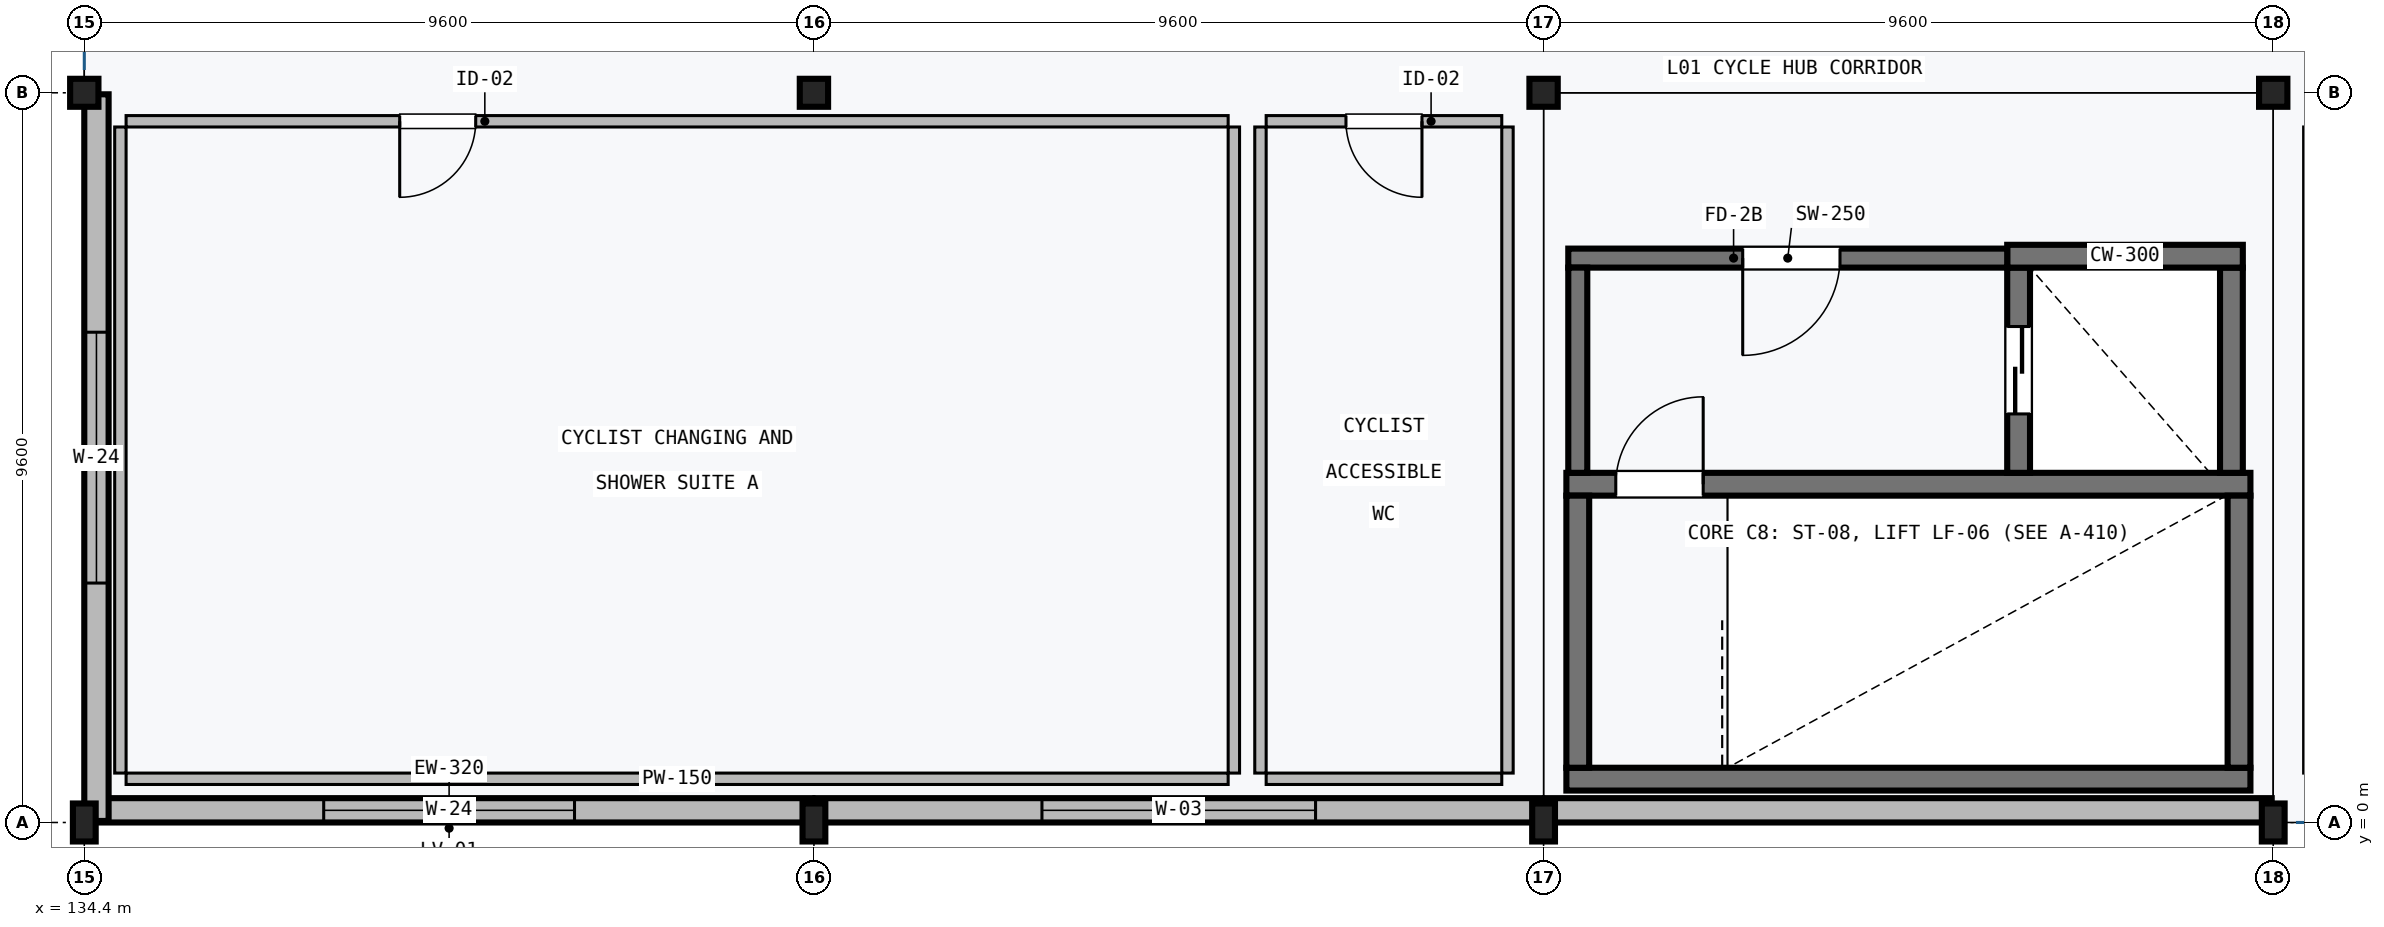
"""IFC4 building model, lengths in metres.
Left out: names, types, materials, properties, quantities, classifications, styles, units other than length and angle.
Written with IfcOpenShell. Run it as: python <this file> out.ifc"""

import sys

from ifc_helpers import new_model, si_unit, direction, frame, frame_2d, origin, origin_2d, place, context, subcontext, project, spatial, rectangle, i_section, extrude, element, fill, save


model = new_model("IFC4")
c1 = context("Model", 3, precision=1e-05, world=origin(), true_north=direction((0.0, 1.0)))
c2 = subcontext(c1, "Body", "Model", "MODEL_VIEW")
j1 = project(units=[si_unit("LENGTHUNIT", "METRE"), si_unit("PLANEANGLEUNIT", "RADIAN")], contexts=[c1])
p1 = place(None, origin())
s1 = spatial("IfcSite", under=j1, at=p1, CompositionType="ELEMENT")
p2 = place(p1, origin())
s2 = spatial("IfcBuilding", under=s1, at=p2, CompositionType="ELEMENT")
p3 = place(p2, frame((0.0, 0.0, 6.0)))
s3 = spatial("IfcBuildingStorey", under=s2, at=p3, CompositionType="ELEMENT", Elevation=6.0)
p4 = place(p3, frame((134.4, 0.0, 0.0), z_axis=(0.0, 0.0, 1.0), x_axis=(1.0, 0.0, 0.0)))
e1 = element("IfcColumn", 1, at=p4, inside=s3, PredefinedType="COLUMN", context=c2, shape_type="SweptSolid", body=[
    extrude(i_section(OverallWidth=0.3, OverallDepth=0.5, WebThickness=0.014, FlangeThickness=0.028, FilletRadius=0.027, at=origin_2d()), origin(), (0.0, 0.0, 1.0), 4.25),
])
p5 = place(p3, frame((134.4, 9.6, 0.0), z_axis=(0.0, 0.0, 1.0), x_axis=(1.0, 0.0, 0.0)))
e2 = element("IfcColumn", 2, at=p5, inside=s3, PredefinedType="COLUMN", context=c2, shape_type="SweptSolid", body=[
    extrude(i_section(OverallWidth=0.373, OverallDepth=0.368, WebThickness=0.014, FlangeThickness=0.024, FilletRadius=0.015, at=origin_2d()), origin(), (0.0, 0.0, 1.0), 4.25),
])
p6 = place(p3, frame((144.0, 0.0, 0.0), z_axis=(0.0, 0.0, 1.0), x_axis=(1.0, 0.0, 0.0)))
e3 = element("IfcColumn", 3, at=p6, inside=s3, PredefinedType="COLUMN", context=c2, shape_type="SweptSolid", body=[
    extrude(i_section(OverallWidth=0.3, OverallDepth=0.5, WebThickness=0.014, FlangeThickness=0.028, FilletRadius=0.027, at=origin_2d()), origin(), (0.0, 0.0, 1.0), 4.25),
])
p7 = place(p3, frame((144.0, 9.6, 0.0), z_axis=(0.0, 0.0, 1.0), x_axis=(1.0, 0.0, 0.0)))
e4 = element("IfcColumn", 4, at=p7, inside=s3, PredefinedType="COLUMN", context=c2, shape_type="SweptSolid", body=[
    extrude(i_section(OverallWidth=0.373, OverallDepth=0.368, WebThickness=0.014, FlangeThickness=0.024, FilletRadius=0.015, at=origin_2d()), origin(), (0.0, 0.0, 1.0), 4.25),
])
p8 = place(p3, frame((153.6, 0.0, 0.0), z_axis=(0.0, 0.0, 1.0), x_axis=(1.0, 0.0, 0.0)))
e5 = element("IfcColumn", 5, at=p8, inside=s3, PredefinedType="COLUMN", context=c2, shape_type="SweptSolid", body=[
    extrude(i_section(OverallWidth=0.3, OverallDepth=0.5, WebThickness=0.014, FlangeThickness=0.028, FilletRadius=0.027, at=origin_2d()), origin(), (0.0, 0.0, 1.0), 4.25),
])
p9 = place(p3, frame((153.6, 9.6, 0.0), z_axis=(0.0, 0.0, 1.0), x_axis=(1.0, 0.0, 0.0)))
e6 = element("IfcColumn", 6, at=p9, inside=s3, PredefinedType="COLUMN", context=c2, shape_type="SweptSolid", body=[
    extrude(i_section(OverallWidth=0.373, OverallDepth=0.368, WebThickness=0.014, FlangeThickness=0.024, FilletRadius=0.015, at=origin_2d()), origin(), (0.0, 0.0, 1.0), 4.25),
])
p10 = place(p3, frame((163.2, 0.0, 0.0), z_axis=(0.0, 0.0, 1.0), x_axis=(1.0, 0.0, 0.0)))
e7 = element("IfcColumn", 7, at=p10, inside=s3, PredefinedType="COLUMN", context=c2, shape_type="SweptSolid", body=[
    extrude(i_section(OverallWidth=0.3, OverallDepth=0.5, WebThickness=0.014, FlangeThickness=0.028, FilletRadius=0.027, at=origin_2d()), origin(), (0.0, 0.0, 1.0), 4.25),
])
p11 = place(p3, frame((163.2, 9.6, 0.0), z_axis=(0.0, 0.0, 1.0), x_axis=(1.0, 0.0, 0.0)))
e8 = element("IfcColumn", 8, at=p11, inside=s3, PredefinedType="COLUMN", context=c2, shape_type="SweptSolid", body=[
    extrude(i_section(OverallWidth=0.373, OverallDepth=0.368, WebThickness=0.014, FlangeThickness=0.024, FilletRadius=0.015, at=origin_2d()), origin(), (0.0, 0.0, 1.0), 4.25),
])
p12 = place(p3, frame((153.9, 0.57, 0.0), z_axis=(0.0, 0.0, 1.0), x_axis=(1.0, 0.0, 0.0)))
e9 = element("IfcWall", 9, at=p12, inside=s3, PredefinedType="SHEAR", context=c2, shape_type="SweptSolid", body=[
    extrude(rectangle(XDim=9.0, YDim=0.3, at=frame_2d((4.5, 0.0))), origin(), (0.0, 0.0, 1.0), 4.25),
])
p13 = place(p3, frame((162.9, 4.45, 0.0), z_axis=(0.0, 0.0, 1.0), x_axis=(-1.0, 0.0, 0.0)))
e10 = element("IfcWall", 10, at=p13, inside=s3, PredefinedType="SHEAR", context=c2, shape_type="SweptSolid", body=[
    extrude(rectangle(XDim=9.0, YDim=0.3, at=frame_2d((4.5, 0.0))), origin(), (0.0, 0.0, 1.0), 4.5),
])
p14 = place(p13, frame((7.2, 0.0, 0.0)))
e11 = element("IfcOpeningElement", 11, at=p14, cuts=e10, PredefinedType="OPENING", context=c2, shape_type="SweptSolid", body=[
    extrude(rectangle(XDim=1.15, YDim=2.15, at=frame_2d((0.575, 1.075))), frame((0.0, 0.16, 0.0), z_axis=(0.0, -1.0, 0.0), x_axis=(1.0, 0.0, 0.0)), (0.0, 0.0, 1.0), 0.32),
])
for number, where, z_axis, x_axis in (
    (12, (154.05, 0.72, 0.0), (0.0, 0.0, 1.0), (0.0, 1.0, 0.0)),
    (13, (162.75, 4.3, 0.0), (0.0, 0.0, 1.0), (0.0, -1.0, 0.0)),
):
    element("IfcWall", number, at=place(p3, frame(where, z_axis=z_axis, x_axis=x_axis)), inside=s3, PredefinedType="SHEAR", context=c2, shape_type="SweptSolid", body=[
        extrude(rectangle(XDim=3.58, YDim=0.3, at=frame_2d((1.79, 0.0))), origin(), (0.0, 0.0, 1.0), 4.25),
    ])
p15 = place(p3, frame((159.85, 7.3, 0.0), z_axis=(0.0, 0.0, 1.0), x_axis=(0.0, -1.0, 0.0)))
e14 = element("IfcWall", 14, at=p15, inside=s3, PredefinedType="SHEAR", context=c2, shape_type="SweptSolid", body=[
    extrude(rectangle(XDim=2.7, YDim=0.3, at=frame_2d((1.35, 0.0))), origin(), (0.0, 0.0, 1.0), 4.5),
])
p16 = place(p15, frame((0.775, 0.0, 0.0)))
e15 = element("IfcOpeningElement", 15, at=p16, cuts=e14, PredefinedType="OPENING", context=c2, shape_type="SweptSolid", body=[
    extrude(rectangle(XDim=1.15, YDim=2.1, at=frame_2d((0.575, 1.05))), frame((0.0, 0.16, 0.0), z_axis=(0.0, -1.0, 0.0), x_axis=(1.0, 0.0, 0.0)), (0.0, 0.0, 1.0), 0.32),
])
p17 = place(p3, frame((162.65, 4.6, 0.0), z_axis=(0.0, 0.0, 1.0), x_axis=(0.0, 1.0, 0.0)))
e16 = element("IfcWall", 16, at=p17, inside=s3, PredefinedType="SHEAR", context=c2, shape_type="SweptSolid", body=[
    extrude(rectangle(XDim=2.7, YDim=0.3, at=frame_2d((1.35, 0.0))), origin(), (0.0, 0.0, 1.0), 4.5),
])
p18 = place(p3, frame((159.7, 7.45, 0.0), z_axis=(0.0, 0.0, 1.0), x_axis=(1.0, 0.0, 0.0)))
e17 = element("IfcWall", 17, at=p18, inside=s3, PredefinedType="SHEAR", context=c2, shape_type="SweptSolid", body=[
    extrude(rectangle(XDim=3.1, YDim=0.3, at=frame_2d((1.55, 0.0))), origin(), (0.0, 0.0, 1.0), 4.5),
])
p19 = place(p3, frame((159.7, 7.425, 0.0), z_axis=(0.0, 0.0, 1.0), x_axis=(-1.0, 0.0, 0.0)))
e18 = element("IfcWall", 18, at=p19, inside=s3, PredefinedType="SHEAR", context=c2, shape_type="SweptSolid", body=[
    extrude(rectangle(XDim=5.775, YDim=0.25, at=frame_2d((2.887, 0.0))), origin(), (0.0, 0.0, 1.0), 4.25),
])
p20 = place(p19, frame((2.2, 0.0, 0.0)))
e19 = element("IfcOpeningElement", 19, at=p20, cuts=e18, PredefinedType="OPENING", context=c2, shape_type="SweptSolid", body=[
    extrude(rectangle(XDim=1.28, YDim=2.2, at=frame_2d((0.64, 1.1))), frame((0.0, 0.135, 0.0), z_axis=(0.0, -1.0, 0.0), x_axis=(1.0, 0.0, 0.0)), (0.0, 0.0, 1.0), 0.27),
])
p21 = place(p3, frame((154.05, 4.6, 0.0), z_axis=(0.0, 0.0, 1.0), x_axis=(0.0, 1.0, 0.0)))
e20 = element("IfcWall", 20, at=p21, inside=s3, PredefinedType="SHEAR", context=c2, shape_type="SweptSolid", body=[
    extrude(rectangle(XDim=2.7, YDim=0.25, at=frame_2d((1.35, 0.0))), origin(), (0.0, 0.0, 1.0), 4.25),
])
p22 = place(p3, frame((143.98, 0.16, 0.0), z_axis=(0.0, 0.0, 1.0), x_axis=(-1.0, 0.0, 0.0)))
e21 = element("IfcWall", 21, at=p22, inside=s3, PredefinedType="SOLIDWALL", context=c2, shape_type="SweptSolid", body=[
    extrude(rectangle(XDim=9.56, YDim=0.32, at=frame_2d((4.78, 0.0))), origin(), (0.0, 0.0, 1.0), 3.9),
])
p23 = place(p22, frame((3.13, 0.0, 0.9)))
e22 = element("IfcOpeningElement", 22, at=p23, cuts=e21, PredefinedType="OPENING", context=c2, shape_type="SweptSolid", body=[
    extrude(rectangle(XDim=3.3, YDim=1.5, at=frame_2d((1.65, 0.75))), frame((0.0, 0.17, 0.0), z_axis=(0.0, -1.0, 0.0), x_axis=(1.0, 0.0, 0.0)), (0.0, 0.0, 1.0), 0.34),
])
p24 = place(p3, frame((134.56, 0.02, 0.0), z_axis=(0.0, 0.0, 1.0), x_axis=(0.0, 1.0, 0.0)))
e23 = element("IfcWall", 23, at=p24, inside=s3, PredefinedType="SOLIDWALL", context=c2, shape_type="SweptSolid", body=[
    extrude(rectangle(XDim=9.56, YDim=0.32, at=frame_2d((4.78, 0.0))), origin(), (0.0, 0.0, 1.0), 3.717),
])
p25 = place(p24, frame((3.13, 0.0, 0.9)))
e24 = element("IfcOpeningElement", 24, at=p25, cuts=e23, PredefinedType="OPENING", context=c2, shape_type="SweptSolid", body=[
    extrude(rectangle(XDim=3.3, YDim=1.5, at=frame_2d((1.65, 0.75))), frame((0.0, 0.17, 0.0), z_axis=(0.0, -1.0, 0.0), x_axis=(1.0, 0.0, 0.0)), (0.0, 0.0, 1.0), 0.34),
])
p26 = place(p3, frame((153.58, 0.16, 0.0), z_axis=(0.0, 0.0, 1.0), x_axis=(-1.0, 0.0, 0.0)))
e25 = element("IfcWall", 25, at=p26, inside=s3, PredefinedType="SOLIDWALL", context=c2, shape_type="SweptSolid", body=[
    extrude(rectangle(XDim=9.56, YDim=0.32, at=frame_2d((4.78, 0.0))), origin(), (0.0, 0.0, 1.0), 3.9),
])
p27 = place(p26, frame((2.98, 0.0, 0.9)))
e26 = element("IfcOpeningElement", 26, at=p27, cuts=e25, PredefinedType="OPENING", context=c2, shape_type="SweptSolid", body=[
    extrude(rectangle(XDim=3.6, YDim=2.1, at=frame_2d((1.8, 1.05))), frame((0.0, 0.17, 0.0), z_axis=(0.0, -1.0, 0.0), x_axis=(1.0, 0.0, 0.0)), (0.0, 0.0, 1.0), 0.34),
])
p28 = place(p3, frame((163.18, 0.16, 0.0), z_axis=(0.0, 0.0, 1.0), x_axis=(-1.0, 0.0, 0.0)))
e27 = element("IfcWall", 27, at=p28, inside=s3, PredefinedType="SOLIDWALL", context=c2, shape_type="SweptSolid", body=[
    extrude(rectangle(XDim=9.56, YDim=0.32, at=frame_2d((4.78, 0.0))), origin(), (0.0, 0.0, 1.0), 3.9),
])
p29 = place(p3, frame((149.45, 0.575, 0.0), z_axis=(0.0, 0.0, 1.0), x_axis=(-1.0, 0.0, 0.0)))
e28 = element("IfcWall", 28, at=p29, inside=s3, PredefinedType="PLUMBINGWALL", context=c2, shape_type="SweptSolid", body=[
    extrude(rectangle(XDim=14.5, YDim=0.15, at=frame_2d((7.25, 0.0))), origin(), (0.0, 0.0, 1.0), 3.707),
])
p30 = place(p3, frame((134.95, 9.225, 0.0), z_axis=(0.0, 0.0, 1.0), x_axis=(1.0, 0.0, 0.0)))
e29 = element("IfcWall", 29, at=p30, inside=s3, PredefinedType="PLUMBINGWALL", context=c2, shape_type="SweptSolid", body=[
    extrude(rectangle(XDim=14.5, YDim=0.15, at=frame_2d((7.25, 0.0))), origin(), (0.0, 0.0, 1.0), 3.707),
])
p31 = place(p30, frame((3.6, 0.0, 0.0)))
e30 = element("IfcOpeningElement", 30, at=p31, cuts=e29, PredefinedType="OPENING", context=c2, shape_type="SweptSolid", body=[
    extrude(rectangle(XDim=1.0, YDim=2.15, at=frame_2d((0.5, 1.075))), frame((0.0, 0.085, 0.0), z_axis=(0.0, -1.0, 0.0), x_axis=(1.0, 0.0, 0.0)), (0.0, 0.0, 1.0), 0.17),
])
for number, where, z_axis, x_axis in (
    (31, (134.875, 0.65, 0.0), (0.0, 0.0, 1.0), (0.0, 1.0, 0.0)),
    (32, (149.525, 9.15, 0.0), (0.0, 0.0, 1.0), (0.0, -1.0, 0.0)),
):
    element("IfcWall", number, at=place(p3, frame(where, z_axis=z_axis, x_axis=x_axis)), inside=s3, PredefinedType="PLUMBINGWALL", context=c2, shape_type="SweptSolid", body=[
        extrude(rectangle(XDim=8.5, YDim=0.15, at=frame_2d((4.25, 0.0))), origin(), (0.0, 0.0, 1.0), 3.89),
    ])
p32 = place(p3, frame((153.05, 0.575, 0.0), z_axis=(0.0, 0.0, 1.0), x_axis=(-1.0, 0.0, 0.0)))
e33 = element("IfcWall", 33, at=p32, inside=s3, PredefinedType="PLUMBINGWALL", context=c2, shape_type="SweptSolid", body=[
    extrude(rectangle(XDim=3.1, YDim=0.15, at=frame_2d((1.55, 0.0))), origin(), (0.0, 0.0, 1.0), 3.89),
])
p33 = place(p3, frame((149.95, 9.225, 0.0), z_axis=(0.0, 0.0, 1.0), x_axis=(1.0, 0.0, 0.0)))
e34 = element("IfcWall", 34, at=p33, inside=s3, PredefinedType="PLUMBINGWALL", context=c2, shape_type="SweptSolid", body=[
    extrude(rectangle(XDim=3.1, YDim=0.15, at=frame_2d((1.55, 0.0))), origin(), (0.0, 0.0, 1.0), 3.89),
])
p34 = place(p33, frame((1.05, 0.0, 0.0)))
e35 = element("IfcOpeningElement", 35, at=p34, cuts=e34, PredefinedType="OPENING", context=c2, shape_type="SweptSolid", body=[
    extrude(rectangle(XDim=1.0, YDim=2.15, at=frame_2d((0.5, 1.075))), frame((0.0, 0.085, 0.0), z_axis=(0.0, -1.0, 0.0), x_axis=(1.0, 0.0, 0.0)), (0.0, 0.0, 1.0), 0.17),
])
for number, where, z_axis, x_axis in (
    (36, (149.875, 0.65, 0.0), (0.0, 0.0, 1.0), (0.0, 1.0, 0.0)),
    (37, (153.125, 9.15, 0.0), (0.0, 0.0, 1.0), (0.0, -1.0, 0.0)),
):
    element("IfcWall", number, at=place(p3, frame(where, z_axis=z_axis, x_axis=x_axis)), inside=s3, PredefinedType="PLUMBINGWALL", context=c2, shape_type="SweptSolid", body=[
        extrude(rectangle(XDim=8.5, YDim=0.15, at=frame_2d((4.25, 0.0))), origin(), (0.0, 0.0, 1.0), 3.89),
    ])
p35 = place(p14, frame((1.15, 0.0, 0.0), z_axis=(0.0, 0.0, 1.0), x_axis=(-1.0, 0.0, 0.0)))
e38 = element("IfcDoor", 38, at=p35, inside=s3, OperationType="SINGLE_SWING_LEFT", PredefinedType="DOOR", context=c2, shape_type="SweptSolid", body=[
    extrude(rectangle(XDim=1.15, YDim=2.15, at=frame_2d((0.575, 1.075))), frame((0.0, 0.025, 0.0), z_axis=(0.0, -1.0, 0.0), x_axis=(1.0, 0.0, 0.0)), (0.0, 0.0, 1.0), 0.05),
])
fill(e11, e38)
p36 = place(p16, frame((1.15, 0.0, 0.0), z_axis=(0.0, 0.0, 1.0), x_axis=(-1.0, 0.0, 0.0)))
e39 = element("IfcDoor", 39, at=p36, inside=s3, OperationType="DOUBLE_DOOR_SLIDING", PredefinedType="DOOR", context=c2, shape_type="SweptSolid", body=[
    extrude(rectangle(XDim=1.15, YDim=2.1, at=frame_2d((0.575, 1.05))), frame((0.0, 0.025, 0.0), z_axis=(0.0, -1.0, 0.0), x_axis=(1.0, 0.0, 0.0)), (0.0, 0.0, 1.0), 0.05),
])
fill(e15, e39)
p37 = place(p20, origin())
e40 = element("IfcDoor", 40, at=p37, inside=s3, OperationType="SINGLE_SWING_RIGHT", PredefinedType="DOOR", context=c2, shape_type="SweptSolid", body=[
    extrude(rectangle(XDim=1.28, YDim=2.2, at=frame_2d((0.64, 1.1))), frame((0.0, 0.025, 0.0), z_axis=(0.0, -1.0, 0.0), x_axis=(1.0, 0.0, 0.0)), (0.0, 0.0, 1.0), 0.05),
])
fill(e19, e40)
p38 = place(p23, origin())
e41 = element("IfcWindow", 41, at=p38, inside=s3, PartitioningType="SINGLE_PANEL", PredefinedType="WINDOW", context=c2, shape_type="SweptSolid", body=[
    extrude(rectangle(XDim=3.3, YDim=1.5, at=frame_2d((1.65, 0.75))), frame((0.0, 0.03, 0.0), z_axis=(0.0, -1.0, 0.0), x_axis=(1.0, 0.0, 0.0)), (0.0, 0.0, 1.0), 0.06),
])
fill(e22, e41)
p39 = place(p25, origin())
e42 = element("IfcWindow", 42, at=p39, inside=s3, PartitioningType="SINGLE_PANEL", PredefinedType="WINDOW", context=c2, shape_type="SweptSolid", body=[
    extrude(rectangle(XDim=3.3, YDim=1.5, at=frame_2d((1.65, 0.75))), frame((0.0, 0.03, 0.0), z_axis=(0.0, -1.0, 0.0), x_axis=(1.0, 0.0, 0.0)), (0.0, 0.0, 1.0), 0.06),
])
fill(e24, e42)
p40 = place(p27, origin())
e43 = element("IfcWindow", 43, at=p40, inside=s3, PartitioningType="SINGLE_PANEL", PredefinedType="WINDOW", context=c2, shape_type="SweptSolid", body=[
    extrude(rectangle(XDim=3.6, YDim=2.1, at=frame_2d((1.8, 1.05))), frame((0.0, 0.03, 0.0), z_axis=(0.0, -1.0, 0.0), x_axis=(1.0, 0.0, 0.0)), (0.0, 0.0, 1.0), 0.06),
])
fill(e26, e43)
p41 = place(p31, frame((1.0, 0.0, 0.0), z_axis=(0.0, 0.0, 1.0), x_axis=(-1.0, 0.0, 0.0)))
e44 = element("IfcDoor", 44, at=p41, inside=s3, OperationType="SINGLE_SWING_LEFT", PredefinedType="DOOR", context=c2, shape_type="SweptSolid", body=[
    extrude(rectangle(XDim=1.0, YDim=2.15, at=frame_2d((0.5, 1.075))), frame((0.0, 0.025, 0.0), z_axis=(0.0, -1.0, 0.0), x_axis=(1.0, 0.0, 0.0)), (0.0, 0.0, 1.0), 0.05),
])
fill(e30, e44)
p42 = place(p34, frame((1.0, 0.0, 0.0), z_axis=(0.0, 0.0, 1.0), x_axis=(-1.0, 0.0, 0.0)))
e45 = element("IfcDoor", 45, at=p42, inside=s3, OperationType="SINGLE_SWING_RIGHT", PredefinedType="DOOR", context=c2, shape_type="SweptSolid", body=[
    extrude(rectangle(XDim=1.0, YDim=2.15, at=frame_2d((0.5, 1.075))), frame((0.0, 0.025, 0.0), z_axis=(0.0, -1.0, 0.0), x_axis=(1.0, 0.0, 0.0)), (0.0, 0.0, 1.0), 0.05),
])
fill(e35, e45)
save(model, sys.argv[1])
